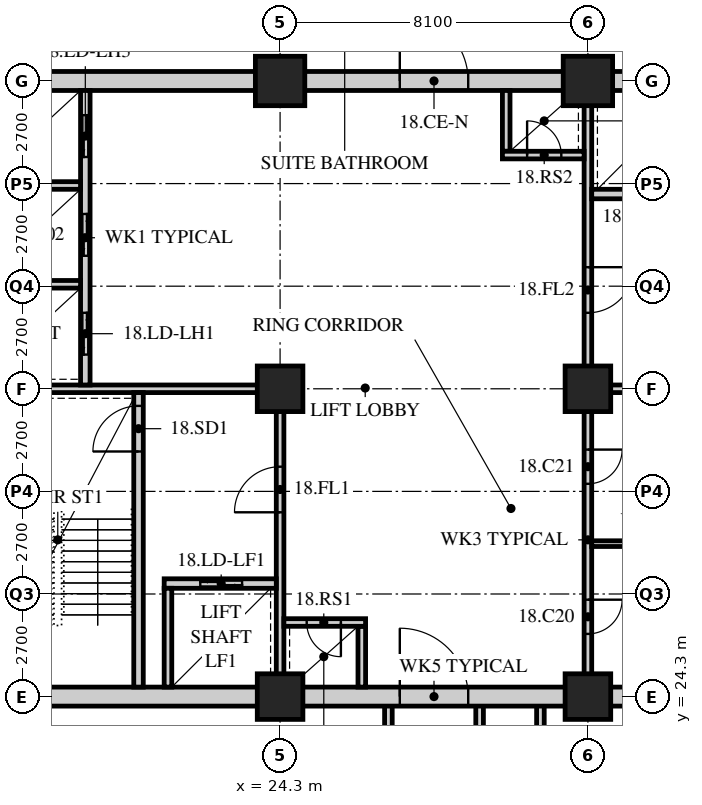
"""IFC4 building model, lengths in metres.
Left out: names, types, materials, properties, quantities, classifications, styles, units other than length and angle.
Written with IfcOpenShell. Run it as: python <this file> out.ifc"""

import sys

from ifc_helpers import new_model, si_unit, direction, frame, frame_2d, origin, origin_2d, place, context, subcontext, project, spatial, rectangle, hollow_rectangle, extrude, element, fill, save


model = new_model("IFC4")
c1 = context("Model", 3, precision=1e-05, world=origin(), true_north=direction((0.0, 1.0)))
c2 = subcontext(c1, "Body", "Model", "MODEL_VIEW")
j1 = project(units=[si_unit("LENGTHUNIT", "METRE"), si_unit("PLANEANGLEUNIT", "RADIAN")], contexts=[c1])
p1 = place(None, origin())
s1 = spatial("IfcSite", under=j1, at=p1, CompositionType="ELEMENT")
p2 = place(p1, origin())
s2 = spatial("IfcBuilding", under=s1, at=p2, CompositionType="ELEMENT")
p3 = place(p2, frame((0.0, 0.0, 73.8)))
s3 = spatial("IfcBuildingStorey", under=s2, at=p3, CompositionType="ELEMENT", Elevation=73.8)
for number, where, z_axis, x_axis in (
    (1, (24.3, 24.3, 0.0), (0.0, 0.0, 1.0), (1.0, 0.0, 0.0)),
    (2, (24.3, 32.4, 0.0), (0.0, 0.0, 1.0), (1.0, 0.0, 0.0)),
):
    element("IfcColumn", number, at=place(p3, frame(where, z_axis=z_axis, x_axis=x_axis)), inside=s3, PredefinedType="COLUMN", context=c2, shape_type="SweptSolid", body=[
        extrude(hollow_rectangle(XDim=1.2, YDim=1.2, WallThickness=0.12, at=origin_2d()), origin(), (0.0, 0.0, 1.0), 3.4),
    ])
p4 = place(p3, frame((24.3, 40.5, 0.0), z_axis=(0.0, 0.0, 1.0), x_axis=(1.0, 0.0, 0.0)))
e3 = element("IfcColumn", 3, at=p4, inside=s3, PredefinedType="COLUMN", context=c2, shape_type="SweptSolid", body=[
    extrude(hollow_rectangle(XDim=1.3, YDim=1.3, WallThickness=0.13, at=origin_2d()), origin(), (0.0, 0.0, 1.0), 3.4),
])
for number, where, z_axis, x_axis in (
    (4, (32.4, 24.3, 0.0), (0.0, 0.0, 1.0), (1.0, 0.0, 0.0)),
    (5, (32.4, 32.4, 0.0), (0.0, 0.0, 1.0), (1.0, 0.0, 0.0)),
):
    element("IfcColumn", number, at=place(p3, frame(where, z_axis=z_axis, x_axis=x_axis)), inside=s3, PredefinedType="COLUMN", context=c2, shape_type="SweptSolid", body=[
        extrude(hollow_rectangle(XDim=1.2, YDim=1.2, WallThickness=0.12, at=origin_2d()), origin(), (0.0, 0.0, 1.0), 3.4),
    ])
p5 = place(p3, frame((32.4, 40.5, 0.0), z_axis=(0.0, 0.0, 1.0), x_axis=(1.0, 0.0, 0.0)))
e6 = element("IfcColumn", 6, at=p5, inside=s3, PredefinedType="COLUMN", context=c2, shape_type="SweptSolid", body=[
    extrude(hollow_rectangle(XDim=1.3, YDim=1.3, WallThickness=0.13, at=origin_2d()), origin(), (0.0, 0.0, 1.0), 3.4),
])
for number, where, z_axis, x_axis in (
    (7, (31.15, 18.0, 0.0), (0.0, 0.0, 1.0), (0.0, 1.0, 0.0)),
    (8, (27.15, 18.0, 0.0), (0.0, 0.0, 1.0), (0.0, 1.0, 0.0)),
    (9, (29.55, 18.0, 0.0), (0.0, 0.0, 1.0), (0.0, 1.0, 0.0)),
):
    element("IfcWall", number, at=place(p3, frame(where, z_axis=z_axis, x_axis=x_axis)), inside=s3, PredefinedType="SOLIDWALL", context=c2, shape_type="SweptSolid", body=[
        extrude(rectangle(XDim=6.3, YDim=0.2, at=frame_2d((3.15, 0.0))), origin(), (0.0, 0.0, 1.0), 3.19),
    ])
p6 = place(p3, frame((15.95, 24.3, 0.0), z_axis=(0.0, 0.0, 1.0), x_axis=(1.0, 0.0, 0.0)))
e10 = element("IfcWall", 10, at=p6, inside=s3, PredefinedType="SOLIDWALL", context=c2, shape_type="SweptSolid", body=[
    extrude(rectangle(XDim=24.8, YDim=0.5, at=frame_2d((12.4, 0.0))), origin(), (0.0, 0.0, 1.0), 2.54),
])
p7 = place(p6, frame((11.5, 0.0, 0.0)))
e11 = element("IfcOpeningElement", 11, at=p7, cuts=e10, PredefinedType="OPENING", context=c2, shape_type="SweptSolid", body=[
    extrude(rectangle(XDim=1.8, YDim=2.4, at=frame_2d((0.9, 1.2))), frame((0.0, 0.26, 0.0), z_axis=(0.0, -1.0, 0.0), x_axis=(1.0, 0.0, 0.0)), (0.0, 0.0, 1.0), 0.52),
])
p8 = place(p3, frame((15.95, 40.5, 0.0), z_axis=(0.0, 0.0, 1.0), x_axis=(1.0, 0.0, 0.0)))
e12 = element("IfcWall", 12, at=p8, inside=s3, PredefinedType="SOLIDWALL", context=c2, shape_type="SweptSolid", body=[
    extrude(rectangle(XDim=24.8, YDim=0.5, at=frame_2d((12.4, 0.0))), origin(), (0.0, 0.0, 1.0), 2.54),
])
p9 = place(p8, frame((11.5, 0.0, 0.0)))
e13 = element("IfcOpeningElement", 13, at=p9, cuts=e12, PredefinedType="OPENING", context=c2, shape_type="SweptSolid", body=[
    extrude(rectangle(XDim=1.8, YDim=2.4, at=frame_2d((0.9, 1.2))), frame((0.0, 0.26, 0.0), z_axis=(0.0, -1.0, 0.0), x_axis=(1.0, 0.0, 0.0)), (0.0, 0.0, 1.0), 0.52),
])
p10 = place(p3, frame((16.45, 32.4, 0.0), z_axis=(0.0, 0.0, 1.0), x_axis=(1.0, 0.0, 0.0)))
e14 = element("IfcWall", 14, at=p10, inside=s3, PredefinedType="SOLIDWALL", context=c2, shape_type="SweptSolid", body=[
    extrude(rectangle(XDim=7.95, YDim=0.2, at=frame_2d((3.975, 0.0))), origin(), (0.0, 0.0, 1.0), 2.578),
])
p11 = place(p3, frame((24.3, 24.55, 0.0), z_axis=(0.0, 0.0, 1.0), x_axis=(0.0, 1.0, 0.0)))
e15 = element("IfcWall", 15, at=p11, inside=s3, PredefinedType="SOLIDWALL", context=c2, shape_type="SweptSolid", body=[
    extrude(rectangle(XDim=7.75, YDim=0.2, at=frame_2d((3.875, 0.0))), origin(), (0.0, 0.0, 1.0), 2.578),
])
p12 = place(p11, frame((4.6, 0.0, 0.0)))
e16 = element("IfcOpeningElement", 16, at=p12, cuts=e15, PredefinedType="OPENING", context=c2, shape_type="SweptSolid", body=[
    extrude(rectangle(XDim=1.2, YDim=2.1, at=frame_2d((0.6, 1.05))), frame((0.0, 0.11, 0.0), z_axis=(0.0, -1.0, 0.0), x_axis=(1.0, 0.0, 0.0)), (0.0, 0.0, 1.0), 0.22),
])
p13 = place(p3, frame((20.575, 24.55, 0.0), z_axis=(0.0, 0.0, 1.0), x_axis=(0.0, 1.0, 0.0)))
e17 = element("IfcWall", 17, at=p13, inside=s3, PredefinedType="SOLIDWALL", context=c2, shape_type="SweptSolid", body=[
    extrude(rectangle(XDim=7.75, YDim=0.25, at=frame_2d((3.875, 0.0))), origin(), (0.0, 0.0, 1.0), 3.19),
])
p14 = place(p13, frame((6.2, 0.0, 0.0)))
e18 = element("IfcOpeningElement", 18, at=p14, cuts=e17, PredefinedType="OPENING", context=c2, shape_type="SweptSolid", body=[
    extrude(rectangle(XDim=1.2, YDim=2.1, at=frame_2d((0.6, 1.05))), frame((0.0, 0.135, 0.0), z_axis=(0.0, -1.0, 0.0), x_axis=(1.0, 0.0, 0.0)), (0.0, 0.0, 1.0), 0.27),
])
p15 = place(p3, frame((21.25, 27.275, 0.0), z_axis=(0.0, 0.0, 1.0), x_axis=(1.0, 0.0, 0.0)))
e19 = element("IfcWall", 19, at=p15, inside=s3, PredefinedType="SOLIDWALL", context=c2, shape_type="SweptSolid", body=[
    extrude(rectangle(XDim=2.95, YDim=0.25, at=frame_2d((1.475, 0.0))), origin(), (0.0, 0.0, 1.0), 3.19),
])
p16 = place(p15, frame((0.95, 0.0, 0.0)))
e20 = element("IfcOpeningElement", 20, at=p16, cuts=e19, PredefinedType="OPENING", context=c2, shape_type="SweptSolid", body=[
    extrude(rectangle(XDim=1.1, YDim=2.4, at=frame_2d((0.55, 1.2))), frame((0.0, 0.135, 0.0), z_axis=(0.0, -1.0, 0.0), x_axis=(1.0, 0.0, 0.0)), (0.0, 0.0, 1.0), 0.27),
])
p17 = place(p3, frame((21.35, 24.55, 0.0), z_axis=(0.0, 0.0, 1.0), x_axis=(0.0, 1.0, 0.0)))
e21 = element("IfcWall", 21, at=p17, inside=s3, PredefinedType="SOLIDWALL", context=c2, shape_type="SweptSolid", body=[
    extrude(rectangle(XDim=2.6, YDim=0.2, at=frame_2d((1.3, 0.0))), origin(), (0.0, 0.0, 1.0), 3.19),
])
p18 = place(p3, frame((19.175, 32.5, 0.0), z_axis=(0.0, 0.0, 1.0), x_axis=(0.0, 1.0, 0.0)))
e22 = element("IfcWall", 22, at=p18, inside=s3, PredefinedType="SOLIDWALL", context=c2, shape_type="SweptSolid", body=[
    extrude(rectangle(XDim=7.75, YDim=0.25, at=frame_2d((3.875, 0.0))), origin(), (0.0, 0.0, 1.0), 3.19),
])
p19 = place(p18, frame((0.8, 0.0, 0.0)))
e23 = element("IfcOpeningElement", 23, at=p19, cuts=e22, PredefinedType="OPENING", context=c2, shape_type="SweptSolid", body=[
    extrude(rectangle(XDim=1.1, YDim=2.4, at=frame_2d((0.55, 1.2))), frame((0.0, 0.135, 0.0), z_axis=(0.0, -1.0, 0.0), x_axis=(1.0, 0.0, 0.0)), (0.0, 0.0, 1.0), 0.27),
])
p20 = place(p18, frame((3.4, 0.0, 0.0)))
e24 = element("IfcOpeningElement", 24, at=p20, cuts=e22, PredefinedType="OPENING", context=c2, shape_type="SweptSolid", body=[
    extrude(rectangle(XDim=1.1, YDim=2.4, at=frame_2d((0.55, 1.2))), frame((0.0, 0.135, 0.0), z_axis=(0.0, -1.0, 0.0), x_axis=(1.0, 0.0, 0.0)), (0.0, 0.0, 1.0), 0.27),
])
p21 = place(p18, frame((6.0, 0.0, 0.0)))
e25 = element("IfcOpeningElement", 25, at=p21, cuts=e22, PredefinedType="OPENING", context=c2, shape_type="SweptSolid", body=[
    extrude(rectangle(XDim=1.1, YDim=2.4, at=frame_2d((0.55, 1.2))), frame((0.0, 0.135, 0.0), z_axis=(0.0, -1.0, 0.0), x_axis=(1.0, 0.0, 0.0)), (0.0, 0.0, 1.0), 0.27),
])
for number, where, z_axis, x_axis in (
    (26, (16.45, 35.15, 0.0), (0.0, 0.0, 1.0), (1.0, 0.0, 0.0)),
    (27, (16.45, 37.75, 0.0), (0.0, 0.0, 1.0), (1.0, 0.0, 0.0)),
):
    element("IfcWall", number, at=place(p3, frame(where, z_axis=z_axis, x_axis=x_axis)), inside=s3, PredefinedType="SOLIDWALL", context=c2, shape_type="SweptSolid", body=[
        extrude(rectangle(XDim=2.6, YDim=0.2, at=frame_2d((1.3, 0.0))), origin(), (0.0, 0.0, 1.0), 3.19),
    ])
p22 = place(p3, frame((26.45, 24.55, 0.0), z_axis=(0.0, 0.0, 1.0), x_axis=(0.0, 1.0, 0.0)))
e28 = element("IfcWall", 28, at=p22, inside=s3, PredefinedType="SOLIDWALL", context=c2, shape_type="SweptSolid", body=[
    extrude(rectangle(XDim=1.6, YDim=0.2, at=frame_2d((0.8, 0.0))), origin(), (0.0, 0.0, 1.0), 3.19),
])
p23 = place(p3, frame((24.4, 26.25, 0.0), z_axis=(0.0, 0.0, 1.0), x_axis=(1.0, 0.0, 0.0)))
e29 = element("IfcWall", 29, at=p23, inside=s3, PredefinedType="SOLIDWALL", context=c2, shape_type="SweptSolid", body=[
    extrude(rectangle(XDim=2.15, YDim=0.2, at=frame_2d((1.075, 0.0))), origin(), (0.0, 0.0, 1.0), 3.19),
])
p24 = place(p23, frame((0.6, 0.0, 0.0)))
e30 = element("IfcOpeningElement", 30, at=p24, cuts=e29, PredefinedType="OPENING", context=c2, shape_type="SweptSolid", body=[
    extrude(rectangle(XDim=0.9, YDim=2.1, at=frame_2d((0.45, 1.05))), frame((0.0, 0.11, 0.0), z_axis=(0.0, -1.0, 0.0), x_axis=(1.0, 0.0, 0.0)), (0.0, 0.0, 1.0), 0.22),
])
p25 = place(p3, frame((32.3, 32.4, 0.0), z_axis=(0.0, 0.0, 1.0), x_axis=(1.0, 0.0, 0.0)))
e31 = element("IfcWall", 31, at=p25, inside=s3, PredefinedType="SOLIDWALL", context=c2, shape_type="SweptSolid", body=[
    extrude(rectangle(XDim=7.95, YDim=0.2, at=frame_2d((3.975, 0.0))), origin(), (0.0, 0.0, 1.0), 2.578),
])
p26 = place(p3, frame((32.4, 32.5, 0.0), z_axis=(0.0, 0.0, 1.0), x_axis=(0.0, 1.0, 0.0)))
e32 = element("IfcWall", 32, at=p26, inside=s3, PredefinedType="SOLIDWALL", context=c2, shape_type="SweptSolid", body=[
    extrude(rectangle(XDim=7.75, YDim=0.2, at=frame_2d((3.875, 0.0))), origin(), (0.0, 0.0, 1.0), 2.578),
])
p27 = place(p26, frame((1.9, 0.0, 0.0)))
e33 = element("IfcOpeningElement", 33, at=p27, cuts=e32, PredefinedType="OPENING", context=c2, shape_type="SweptSolid", body=[
    extrude(rectangle(XDim=1.2, YDim=2.1, at=frame_2d((0.6, 1.05))), frame((0.0, 0.11, 0.0), z_axis=(0.0, -1.0, 0.0), x_axis=(1.0, 0.0, 0.0)), (0.0, 0.0, 1.0), 0.22),
])
p28 = place(p3, frame((32.5, 37.525, 0.0), z_axis=(0.0, 0.0, 1.0), x_axis=(1.0, 0.0, 0.0)))
e34 = element("IfcWall", 34, at=p28, inside=s3, PredefinedType="SOLIDWALL", context=c2, shape_type="SweptSolid", body=[
    extrude(rectangle(XDim=2.95, YDim=0.25, at=frame_2d((1.475, 0.0))), origin(), (0.0, 0.0, 1.0), 3.19),
])
p29 = place(p28, frame((0.9, 0.0, 0.0)))
e35 = element("IfcOpeningElement", 35, at=p29, cuts=e34, PredefinedType="OPENING", context=c2, shape_type="SweptSolid", body=[
    extrude(rectangle(XDim=1.1, YDim=2.4, at=frame_2d((0.55, 1.2))), frame((0.0, 0.135, 0.0), z_axis=(0.0, -1.0, 0.0), x_axis=(1.0, 0.0, 0.0)), (0.0, 0.0, 1.0), 0.27),
])
p30 = place(p3, frame((30.25, 38.65, 0.0), z_axis=(0.0, 0.0, 1.0), x_axis=(0.0, 1.0, 0.0)))
e36 = element("IfcWall", 36, at=p30, inside=s3, PredefinedType="SOLIDWALL", context=c2, shape_type="SweptSolid", body=[
    extrude(rectangle(XDim=1.6, YDim=0.2, at=frame_2d((0.8, 0.0))), origin(), (0.0, 0.0, 1.0), 3.19),
])
p31 = place(p3, frame((30.15, 38.55, 0.0), z_axis=(0.0, 0.0, 1.0), x_axis=(1.0, 0.0, 0.0)))
e37 = element("IfcWall", 37, at=p31, inside=s3, PredefinedType="SOLIDWALL", context=c2, shape_type="SweptSolid", body=[
    extrude(rectangle(XDim=2.15, YDim=0.2, at=frame_2d((1.075, 0.0))), origin(), (0.0, 0.0, 1.0), 3.19),
])
p32 = place(p31, frame((0.65, 0.0, 0.0)))
e38 = element("IfcOpeningElement", 38, at=p32, cuts=e37, PredefinedType="OPENING", context=c2, shape_type="SweptSolid", body=[
    extrude(rectangle(XDim=0.9, YDim=2.1, at=frame_2d((0.45, 1.05))), frame((0.0, 0.11, 0.0), z_axis=(0.0, -1.0, 0.0), x_axis=(1.0, 0.0, 0.0)), (0.0, 0.0, 1.0), 0.22),
])
p33 = place(p3, frame((32.4, 24.55, 0.0), z_axis=(0.0, 0.0, 1.0), x_axis=(0.0, 1.0, 0.0)))
e39 = element("IfcWall", 39, at=p33, inside=s3, PredefinedType="PARTITIONING", context=c2, shape_type="SweptSolid", body=[
    extrude(rectangle(XDim=7.75, YDim=0.2, at=frame_2d((3.875, 0.0))), origin(), (0.0, 0.0, 1.0), 2.578),
])
p34 = place(p33, frame((1.4, 0.0, 0.0)))
e40 = element("IfcOpeningElement", 40, at=p34, cuts=e39, PredefinedType="OPENING", context=c2, shape_type="SweptSolid", body=[
    extrude(rectangle(XDim=0.9, YDim=2.1, at=frame_2d((0.45, 1.05))), frame((0.0, 0.11, 0.0), z_axis=(0.0, -1.0, 0.0), x_axis=(1.0, 0.0, 0.0)), (0.0, 0.0, 1.0), 0.22),
])
p35 = place(p33, frame((5.35, 0.0, 0.0)))
e41 = element("IfcOpeningElement", 41, at=p35, cuts=e39, PredefinedType="OPENING", context=c2, shape_type="SweptSolid", body=[
    extrude(rectangle(XDim=0.9, YDim=2.1, at=frame_2d((0.45, 1.05))), frame((0.0, 0.11, 0.0), z_axis=(0.0, -1.0, 0.0), x_axis=(1.0, 0.0, 0.0)), (0.0, 0.0, 1.0), 0.22),
])
p36 = place(p3, frame((32.5, 28.325, 0.0), z_axis=(0.0, 0.0, 1.0), x_axis=(1.0, 0.0, 0.0)))
e42 = element("IfcWall", 42, at=p36, inside=s3, PredefinedType="PARTITIONING", context=c2, shape_type="SweptSolid", body=[
    extrude(rectangle(XDim=4.9, YDim=0.15, at=frame_2d((2.45, 0.0))), origin(), (0.0, 0.0, 1.0), 3.19),
])
p37 = place(p34, origin())
e43 = element("IfcDoor", 43, at=p37, inside=s3, OperationType="SINGLE_SWING_LEFT", PredefinedType="DOOR", context=c2, shape_type="SweptSolid", body=[
    extrude(rectangle(XDim=0.9, YDim=2.1, at=frame_2d((0.45, 1.05))), frame((0.0, 0.025, 0.0), z_axis=(0.0, -1.0, 0.0), x_axis=(1.0, 0.0, 0.0)), (0.0, 0.0, 1.0), 0.05),
])
fill(e40, e43)
p38 = place(p35, origin())
e44 = element("IfcDoor", 44, at=p38, inside=s3, OperationType="SINGLE_SWING_LEFT", PredefinedType="DOOR", context=c2, shape_type="SweptSolid", body=[
    extrude(rectangle(XDim=0.9, YDim=2.1, at=frame_2d((0.45, 1.05))), frame((0.0, 0.025, 0.0), z_axis=(0.0, -1.0, 0.0), x_axis=(1.0, 0.0, 0.0)), (0.0, 0.0, 1.0), 0.05),
])
fill(e41, e44)
p39 = place(p14, origin())
e45 = element("IfcDoor", 45, at=p39, inside=s3, OperationType="SINGLE_SWING_LEFT", PredefinedType="DOOR", context=c2, shape_type="SweptSolid", body=[
    extrude(rectangle(XDim=1.2, YDim=2.1, at=frame_2d((0.6, 1.05))), frame((0.0, 0.025, 0.0), z_axis=(0.0, -1.0, 0.0), x_axis=(1.0, 0.0, 0.0)), (0.0, 0.0, 1.0), 0.05),
])
fill(e18, e45)
p40 = place(p12, origin())
e46 = element("IfcDoor", 46, at=p40, inside=s3, OperationType="SINGLE_SWING_LEFT", PredefinedType="DOOR", context=c2, shape_type="SweptSolid", body=[
    extrude(rectangle(XDim=1.2, YDim=2.1, at=frame_2d((0.6, 1.05))), frame((0.0, 0.025, 0.0), z_axis=(0.0, -1.0, 0.0), x_axis=(1.0, 0.0, 0.0)), (0.0, 0.0, 1.0), 0.05),
])
fill(e16, e46)
p41 = place(p24, origin())
e47 = element("IfcDoor", 47, at=p41, inside=s3, OperationType="SINGLE_SWING_LEFT", PredefinedType="DOOR", context=c2, shape_type="SweptSolid", body=[
    extrude(rectangle(XDim=0.9, YDim=2.1, at=frame_2d((0.45, 1.05))), frame((0.0, 0.025, 0.0), z_axis=(0.0, -1.0, 0.0), x_axis=(1.0, 0.0, 0.0)), (0.0, 0.0, 1.0), 0.05),
])
fill(e30, e47)
p42 = place(p27, origin())
e48 = element("IfcDoor", 48, at=p42, inside=s3, OperationType="SINGLE_SWING_LEFT", PredefinedType="DOOR", context=c2, shape_type="SweptSolid", body=[
    extrude(rectangle(XDim=1.2, YDim=2.1, at=frame_2d((0.6, 1.05))), frame((0.0, 0.025, 0.0), z_axis=(0.0, -1.0, 0.0), x_axis=(1.0, 0.0, 0.0)), (0.0, 0.0, 1.0), 0.05),
])
fill(e33, e48)
p43 = place(p32, origin())
e49 = element("IfcDoor", 49, at=p43, inside=s3, OperationType="SINGLE_SWING_LEFT", PredefinedType="DOOR", context=c2, shape_type="SweptSolid", body=[
    extrude(rectangle(XDim=0.9, YDim=2.1, at=frame_2d((0.45, 1.05))), frame((0.0, 0.025, 0.0), z_axis=(0.0, -1.0, 0.0), x_axis=(1.0, 0.0, 0.0)), (0.0, 0.0, 1.0), 0.05),
])
fill(e38, e49)
p44 = place(p19, origin())
e50 = element("IfcDoor", 50, at=p44, inside=s3, OperationType="DOUBLE_DOOR_SLIDING", PredefinedType="DOOR", context=c2, shape_type="SweptSolid", body=[
    extrude(rectangle(XDim=1.1, YDim=2.4, at=frame_2d((0.55, 1.2))), frame((0.0, 0.025, 0.0), z_axis=(0.0, -1.0, 0.0), x_axis=(1.0, 0.0, 0.0)), (0.0, 0.0, 1.0), 0.05),
])
fill(e23, e50)
p45 = place(p20, origin())
e51 = element("IfcDoor", 51, at=p45, inside=s3, OperationType="DOUBLE_DOOR_SLIDING", PredefinedType="DOOR", context=c2, shape_type="SweptSolid", body=[
    extrude(rectangle(XDim=1.1, YDim=2.4, at=frame_2d((0.55, 1.2))), frame((0.0, 0.025, 0.0), z_axis=(0.0, -1.0, 0.0), x_axis=(1.0, 0.0, 0.0)), (0.0, 0.0, 1.0), 0.05),
])
fill(e24, e51)
p46 = place(p21, origin())
e52 = element("IfcDoor", 52, at=p46, inside=s3, OperationType="DOUBLE_DOOR_SLIDING", PredefinedType="DOOR", context=c2, shape_type="SweptSolid", body=[
    extrude(rectangle(XDim=1.1, YDim=2.4, at=frame_2d((0.55, 1.2))), frame((0.0, 0.025, 0.0), z_axis=(0.0, -1.0, 0.0), x_axis=(1.0, 0.0, 0.0)), (0.0, 0.0, 1.0), 0.05),
])
fill(e25, e52)
p47 = place(p16, origin())
e53 = element("IfcDoor", 53, at=p47, inside=s3, OperationType="DOUBLE_DOOR_SLIDING", PredefinedType="DOOR", context=c2, shape_type="SweptSolid", body=[
    extrude(rectangle(XDim=1.1, YDim=2.4, at=frame_2d((0.55, 1.2))), frame((0.0, 0.025, 0.0), z_axis=(0.0, -1.0, 0.0), x_axis=(1.0, 0.0, 0.0)), (0.0, 0.0, 1.0), 0.05),
])
fill(e20, e53)
p48 = place(p7, origin())
e54 = element("IfcDoor", 54, at=p48, inside=s3, OperationType="DOUBLE_DOOR_SINGLE_SWING", PredefinedType="DOOR", context=c2, shape_type="SweptSolid", body=[
    extrude(rectangle(XDim=1.8, YDim=2.4, at=frame_2d((0.9, 1.2))), frame((0.0, 0.025, 0.0), z_axis=(0.0, -1.0, 0.0), x_axis=(1.0, 0.0, 0.0)), (0.0, 0.0, 1.0), 0.05),
])
fill(e11, e54)
p49 = place(p9, origin())
e55 = element("IfcDoor", 55, at=p49, inside=s3, OperationType="DOUBLE_DOOR_SINGLE_SWING", PredefinedType="DOOR", context=c2, shape_type="SweptSolid", body=[
    extrude(rectangle(XDim=1.8, YDim=2.4, at=frame_2d((0.9, 1.2))), frame((0.0, 0.025, 0.0), z_axis=(0.0, -1.0, 0.0), x_axis=(1.0, 0.0, 0.0)), (0.0, 0.0, 1.0), 0.05),
])
fill(e13, e55)
save(model, sys.argv[1])
